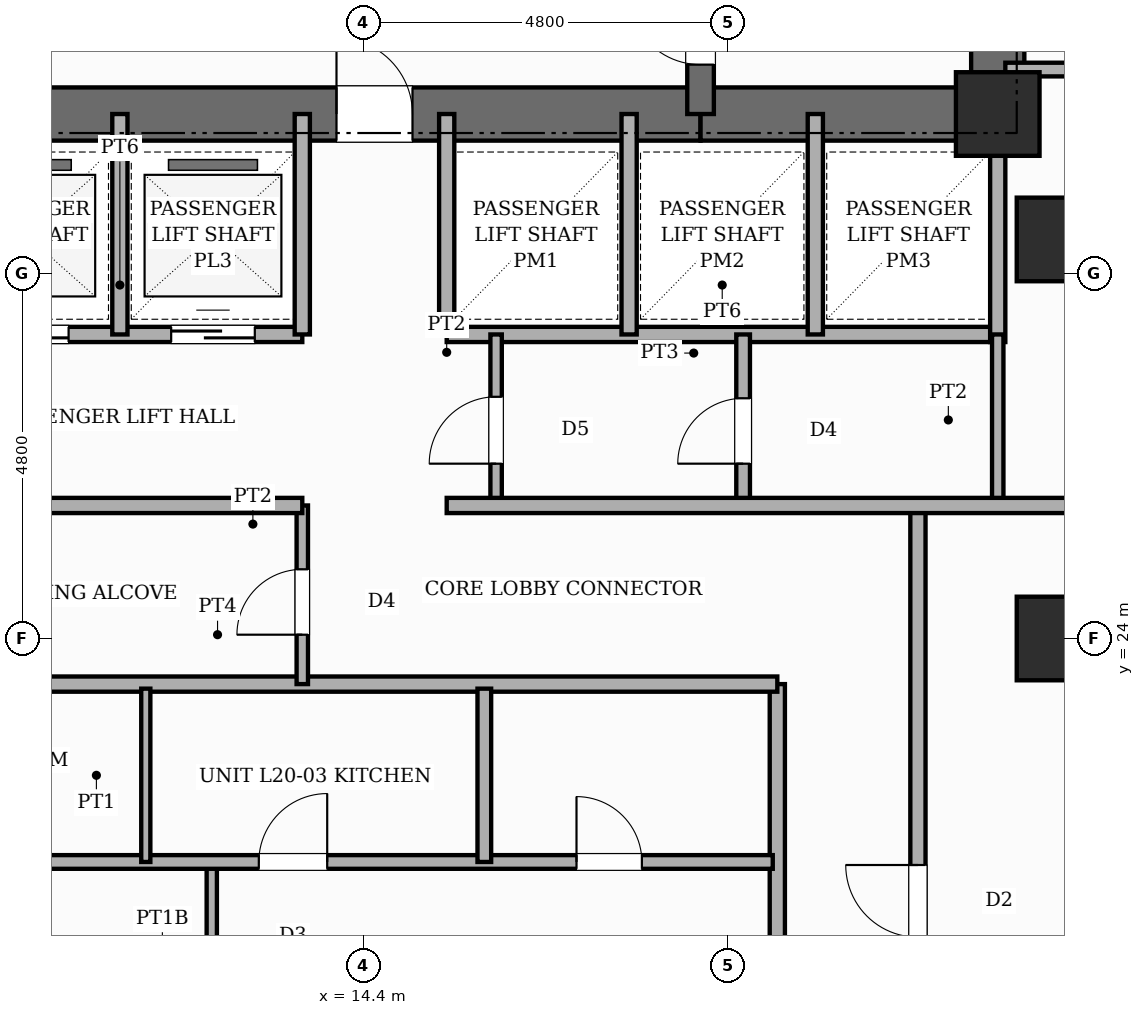
"""IFC4 building model, lengths in metres.
Left out: names, types, materials, properties, quantities, classifications, styles, units other than length and angle.
Written with IfcOpenShell. Run it as: python <this file> out.ifc"""

import sys

from ifc_helpers import new_model, si_unit, direction, frame, frame_2d, origin, origin_2d, place, context, subcontext, project, spatial, rectangle, extrude, element, fill, save


model = new_model("IFC4")
c1 = context("Model", 3, precision=1e-05, world=origin(), true_north=direction((0.0, 1.0)))
c2 = subcontext(c1, "Body", "Model", "MODEL_VIEW")
j1 = project(units=[si_unit("LENGTHUNIT", "METRE"), si_unit("PLANEANGLEUNIT", "RADIAN")], contexts=[c1])
p1 = place(None, origin())
s1 = spatial("IfcSite", under=j1, at=p1, CompositionType="ELEMENT")
p2 = place(p1, origin())
s2 = spatial("IfcBuilding", under=s1, at=p2, CompositionType="ELEMENT")
p3 = place(p2, frame((0.0, 0.0, 79.0)))
s3 = spatial("IfcBuildingStorey", under=s2, at=p3, CompositionType="ELEMENT", Elevation=79.0)
p4 = place(p3, frame((22.75, 30.55, 0.0), z_axis=(0.0, 0.0, 1.0), x_axis=(0.0, 1.0, 0.0)))
e1 = element("IfcWall", 1, at=p4, inside=s3, PredefinedType="SHEAR", context=c2, shape_type="SweptSolid", body=[
    extrude(rectangle(XDim=15.6, YDim=0.7, at=frame_2d((7.8, 0.0))), origin(), (0.0, 0.0, 1.0), 3.6),
])
p5 = place(p4, frame((10.8, 0.0, 0.0)))
e2 = element("IfcOpeningElement", 2, at=p5, cuts=e1, PredefinedType="OPENING", context=c2, shape_type="SweptSolid", body=[
    extrude(rectangle(XDim=1.0, YDim=2.15, at=frame_2d((0.5, 1.075))), frame((0.0, 0.36, 0.0), z_axis=(0.0, -1.0, 0.0), x_axis=(1.0, 0.0, 0.0)), (0.0, 0.0, 1.0), 0.72),
])
p6 = place(p3, frame((9.96, 30.9, 0.0), z_axis=(0.0, 0.0, 1.0), x_axis=(1.0, 0.0, 0.0)))
e3 = element("IfcWall", 3, at=p6, inside=s3, PredefinedType="SHEAR", context=c2, shape_type="SweptSolid", body=[
    extrude(rectangle(XDim=8.88, YDim=0.7, at=frame_2d((4.44, 0.0))), origin(), (0.0, 0.0, 1.0), 3.6),
])
p7 = place(p6, frame((4.09, 0.0, 0.0)))
e4 = element("IfcOpeningElement", 4, at=p7, cuts=e3, PredefinedType="OPENING", context=c2, shape_type="SweptSolid", body=[
    extrude(rectangle(XDim=1.0, YDim=2.15, at=frame_2d((0.5, 1.075))), frame((0.0, 0.36, 0.0), z_axis=(0.0, -1.0, 0.0), x_axis=(1.0, 0.0, 0.0)), (0.0, 0.0, 1.0), 0.72),
])
p8 = place(p3, frame((18.84, 30.9, 0.0), z_axis=(0.0, 0.0, 1.0), x_axis=(1.0, 0.0, 0.0)))
e5 = element("IfcWall", 5, at=p8, inside=s3, PredefinedType="SHEAR", context=c2, shape_type="SweptSolid", body=[
    extrude(rectangle(XDim=3.91, YDim=0.7, at=frame_2d((1.955, 0.0))), origin(), (0.0, 0.0, 1.0), 3.6),
])
p9 = place(p3, frame((18.84, 30.9, 0.0), z_axis=(0.0, 0.0, 1.0), x_axis=(0.0, 1.0, 0.0)))
e6 = element("IfcWall", 6, at=p9, inside=s3, PredefinedType="SHEAR", context=c2, shape_type="SweptSolid", body=[
    extrude(rectangle(XDim=14.9, YDim=0.35, at=frame_2d((7.45, 0.0))), origin(), (0.0, 0.0, 1.0), 3.6),
])
p10 = place(p9, frame((0.65, 0.0, 0.0)))
e7 = element("IfcOpeningElement", 7, at=p10, cuts=e6, PredefinedType="OPENING", context=c2, shape_type="SweptSolid", body=[
    extrude(rectangle(XDim=0.95, YDim=2.1, at=frame_2d((0.475, 1.05))), frame((0.0, 0.185, 0.0), z_axis=(0.0, -1.0, 0.0), x_axis=(1.0, 0.0, 0.0)), (0.0, 0.0, 1.0), 0.37),
])
p11 = place(p9, frame((10.45, 0.0, 0.0)))
e8 = element("IfcOpeningElement", 8, at=p11, cuts=e6, PredefinedType="OPENING", context=c2, shape_type="SweptSolid", body=[
    extrude(rectangle(XDim=1.0, YDim=2.15, at=frame_2d((0.5, 1.075))), frame((0.0, 0.185, 0.0), z_axis=(0.0, -1.0, 0.0), x_axis=(1.0, 0.0, 0.0)), (0.0, 0.0, 1.0), 0.37),
])
for number, where, z_axis, x_axis in (
    (9, (22.75, 30.9, 0.0), (0.0, 0.0, 1.0), (1.0, 0.0, 0.0)),
    (10, (23.55, 24.0, 0.0), (0.0, 0.0, 1.0), (1.0, 0.0, 0.0)),
    (11, (23.55, 29.25, 0.0), (0.0, 0.0, 1.0), (1.0, 0.0, 0.0)),
):
    element("IfcColumn", number, at=place(p3, frame(where, z_axis=z_axis, x_axis=x_axis)), inside=s3, PredefinedType="COLUMN", context=c2, shape_type="SweptSolid", body=[
        extrude(rectangle(XDim=1.1, YDim=1.1, at=origin_2d()), origin(), (0.0, 0.0, 1.0), 3.6),
    ])
p12 = place(p3, frame((6.05, 28.0, 0.0), z_axis=(0.0, 0.0, 1.0), x_axis=(1.0, 0.0, 0.0)))
e12 = element("IfcWall", 12, at=p12, inside=s3, PredefinedType="POLYGONAL", context=c2, shape_type="SweptSolid", body=[
    extrude(rectangle(XDim=7.55, YDim=0.2, at=frame_2d((3.775, 0.0))), origin(), (0.0, 0.0, 1.0), 3.35),
])
p13 = place(p12, frame((0.925, 0.0, 0.0)))
e13 = element("IfcOpeningElement", 13, at=p13, cuts=e12, PredefinedType="OPENING", context=c2, shape_type="SweptSolid", body=[
    extrude(rectangle(XDim=1.1, YDim=2.15, at=frame_2d((0.55, 1.075))), frame((0.0, 0.11, 0.0), z_axis=(0.0, -1.0, 0.0), x_axis=(1.0, 0.0, 0.0)), (0.0, 0.0, 1.0), 0.22),
])
p14 = place(p12, frame((3.375, 0.0, 0.0)))
e14 = element("IfcOpeningElement", 14, at=p14, cuts=e12, PredefinedType="OPENING", context=c2, shape_type="SweptSolid", body=[
    extrude(rectangle(XDim=1.1, YDim=2.15, at=frame_2d((0.55, 1.075))), frame((0.0, 0.11, 0.0), z_axis=(0.0, -1.0, 0.0), x_axis=(1.0, 0.0, 0.0)), (0.0, 0.0, 1.0), 0.22),
])
p15 = place(p12, frame((5.825, 0.0, 0.0)))
e15 = element("IfcOpeningElement", 15, at=p15, cuts=e12, PredefinedType="OPENING", context=c2, shape_type="SweptSolid", body=[
    extrude(rectangle(XDim=1.1, YDim=2.15, at=frame_2d((0.55, 1.075))), frame((0.0, 0.11, 0.0), z_axis=(0.0, -1.0, 0.0), x_axis=(1.0, 0.0, 0.0)), (0.0, 0.0, 1.0), 0.22),
])
p16 = place(p3, frame((15.5, 28.0, 0.0), z_axis=(0.0, 0.0, 1.0), x_axis=(1.0, 0.0, 0.0)))
e16 = element("IfcWall", 16, at=p16, inside=s3, PredefinedType="POLYGONAL", context=c2, shape_type="SweptSolid", body=[
    extrude(rectangle(XDim=7.25, YDim=0.2, at=frame_2d((3.625, 0.0))), origin(), (0.0, 0.0, 1.0), 3.35),
])
p17 = place(p3, frame((22.75, 27.9, 0.0), z_axis=(0.0, 0.0, 1.0), x_axis=(0.0, 1.0, 0.0)))
e17 = element("IfcWall", 17, at=p17, inside=s3, PredefinedType="POLYGONAL", context=c2, shape_type="SweptSolid", body=[
    extrude(rectangle(XDim=3.0, YDim=0.2, at=frame_2d((1.5, 0.0))), origin(), (0.0, 0.0, 1.0), 3.35),
])
for number, where, z_axis, x_axis in (
    (18, (13.6, 28.0, 0.0), (0.0, 0.0, 1.0), (0.0, 1.0, 0.0)),
    (19, (15.5, 28.0, 0.0), (0.0, 0.0, 1.0), (0.0, 1.0, 0.0)),
    (20, (11.2, 28.0, 0.0), (0.0, 0.0, 1.0), (0.0, 1.0, 0.0)),
    (21, (17.9, 28.0, 0.0), (0.0, 0.0, 1.0), (0.0, 1.0, 0.0)),
    (22, (20.35, 28.0, 0.0), (0.0, 0.0, 1.0), (0.0, 1.0, 0.0)),
):
    element("IfcWall", number, at=place(p3, frame(where, z_axis=z_axis, x_axis=x_axis)), inside=s3, PredefinedType="POLYGONAL", context=c2, shape_type="SweptSolid", body=[
        extrude(rectangle(XDim=2.9, YDim=0.2, at=frame_2d((1.45, 0.0))), origin(), (0.0, 0.0, 1.0), 3.35),
    ])
p18 = place(p3, frame((16.15, 25.75, 0.0), z_axis=(0.0, 0.0, 1.0), x_axis=(0.0, 1.0, 0.0)))
e23 = element("IfcWall", 23, at=p18, inside=s3, PredefinedType="PARTITIONING", context=c2, shape_type="SweptSolid", body=[
    extrude(rectangle(XDim=2.25, YDim=0.15, at=frame_2d((1.125, 0.0))), origin(), (0.0, 0.0, 1.0), 3.35),
])
p19 = place(p18, frame((0.55, 0.0, 0.0)))
e24 = element("IfcOpeningElement", 24, at=p19, cuts=e23, PredefinedType="OPENING", context=c2, shape_type="SweptSolid", body=[
    extrude(rectangle(XDim=0.88, YDim=2.1, at=frame_2d((0.44, 1.05))), frame((0.0, 0.085, 0.0), z_axis=(0.0, -1.0, 0.0), x_axis=(1.0, 0.0, 0.0)), (0.0, 0.0, 1.0), 0.17),
])
p20 = place(p3, frame((22.75, 25.75, 0.0), z_axis=(0.0, 0.0, 1.0), x_axis=(0.0, 1.0, 0.0)))
e25 = element("IfcWall", 25, at=p20, inside=s3, PredefinedType="PARTITIONING", context=c2, shape_type="SweptSolid", body=[
    extrude(rectangle(XDim=2.25, YDim=0.15, at=frame_2d((1.125, 0.0))), origin(), (0.0, 0.0, 1.0), 3.35),
])
p21 = place(p3, frame((19.4, 25.75, 0.0), z_axis=(0.0, 0.0, 1.0), x_axis=(0.0, 1.0, 0.0)))
e26 = element("IfcWall", 26, at=p21, inside=s3, PredefinedType="PLUMBINGWALL", context=c2, shape_type="SweptSolid", body=[
    extrude(rectangle(XDim=2.25, YDim=0.18, at=frame_2d((1.125, 0.0))), origin(), (0.0, 0.0, 1.0), 3.35),
])
p22 = place(p21, frame((0.55, 0.0, 0.0)))
e27 = element("IfcOpeningElement", 27, at=p22, cuts=e26, PredefinedType="OPENING", context=c2, shape_type="SweptSolid", body=[
    extrude(rectangle(XDim=0.86, YDim=2.1, at=frame_2d((0.43, 1.05))), frame((0.0, 0.1, 0.0), z_axis=(0.0, -1.0, 0.0), x_axis=(1.0, 0.0, 0.0)), (0.0, 0.0, 1.0), 0.2),
])
p23 = place(p3, frame((19.85, 5.12, 0.0), z_axis=(0.0, 0.0, 1.0), x_axis=(0.0, 1.0, 0.0)))
e28 = element("IfcWall", 28, at=p23, inside=s3, PredefinedType="PARTITIONING", context=c2, shape_type="SweptSolid", body=[
    extrude(rectangle(XDim=18.28, YDim=0.2, at=frame_2d((9.14, 0.0))), origin(), (0.0, 0.0, 1.0), 3.35),
])
p24 = place(p23, frame((1.001, 0.0, 0.0)))
e29 = element("IfcOpeningElement", 29, at=p24, cuts=e28, PredefinedType="OPENING", context=c2, shape_type="SweptSolid", body=[
    extrude(rectangle(XDim=0.98, YDim=2.18, at=frame_2d((0.49, 1.09))), frame((0.0, 0.11, 0.0), z_axis=(0.0, -1.0, 0.0), x_axis=(1.0, 0.0, 0.0)), (0.0, 0.0, 1.0), 0.22),
])
p25 = place(p23, frame((5.88, 0.0, 0.0)))
e30 = element("IfcOpeningElement", 30, at=p25, cuts=e28, PredefinedType="OPENING", context=c2, shape_type="SweptSolid", body=[
    extrude(rectangle(XDim=0.98, YDim=2.18, at=frame_2d((0.49, 1.09))), frame((0.0, 0.11, 0.0), z_axis=(0.0, -1.0, 0.0), x_axis=(1.0, 0.0, 0.0)), (0.0, 0.0, 1.0), 0.22),
])
p26 = place(p23, frame((12.74, 0.0, 0.0)))
e31 = element("IfcOpeningElement", 31, at=p26, cuts=e28, PredefinedType="OPENING", context=c2, shape_type="SweptSolid", body=[
    extrude(rectangle(XDim=0.98, YDim=2.18, at=frame_2d((0.49, 1.09))), frame((0.0, 0.11, 0.0), z_axis=(0.0, -1.0, 0.0), x_axis=(1.0, 0.0, 0.0)), (0.0, 0.0, 1.0), 0.22),
])
p27 = place(p3, frame((21.7, 5.16, 0.0), z_axis=(0.0, 0.0, 1.0), x_axis=(0.0, 1.0, 0.0)))
e32 = element("IfcWall", 32, at=p27, inside=s3, PredefinedType="PARTITIONING", context=c2, shape_type="SweptSolid", body=[
    extrude(rectangle(XDim=20.59, YDim=0.2, at=frame_2d((10.295, 0.0))), origin(), (0.0, 0.0, 1.0), 3.35),
])
p28 = place(p27, frame((5.34, 0.0, 0.0)))
e33 = element("IfcOpeningElement", 33, at=p28, cuts=e32, PredefinedType="OPENING", context=c2, shape_type="SweptSolid", body=[
    extrude(rectangle(XDim=0.95, YDim=2.15, at=frame_2d((0.475, 1.075))), frame((0.0, 0.11, 0.0), z_axis=(0.0, -1.0, 0.0), x_axis=(1.0, 0.0, 0.0)), (0.0, 0.0, 1.0), 0.22),
])
p29 = place(p27, frame((14.91, 0.0, 0.0)))
e34 = element("IfcOpeningElement", 34, at=p29, cuts=e32, PredefinedType="OPENING", context=c2, shape_type="SweptSolid", body=[
    extrude(rectangle(XDim=0.95, YDim=2.15, at=frame_2d((0.475, 1.075))), frame((0.0, 0.11, 0.0), z_axis=(0.0, -1.0, 0.0), x_axis=(1.0, 0.0, 0.0)), (0.0, 0.0, 1.0), 0.22),
])
p30 = place(p3, frame((5.12, 23.4, 0.0), z_axis=(0.0, 0.0, 1.0), x_axis=(1.0, 0.0, 0.0)))
e35 = element("IfcWall", 35, at=p30, inside=s3, PredefinedType="PARTITIONING", context=c2, shape_type="SweptSolid", body=[
    extrude(rectangle(XDim=14.73, YDim=0.2, at=frame_2d((7.365, 0.0))), origin(), (0.0, 0.0, 1.0), 3.35),
])
p31 = place(p3, frame((15.5, 25.75, 0.0), z_axis=(0.0, 0.0, 1.0), x_axis=(1.0, 0.0, 0.0)))
e36 = element("IfcWall", 36, at=p31, inside=s3, PredefinedType="PARTITIONING", context=c2, shape_type="SweptSolid", body=[
    extrude(rectangle(XDim=8.18, YDim=0.2, at=frame_2d((4.09, 0.0))), origin(), (0.0, 0.0, 1.0), 3.35),
])
p32 = place(p3, frame((13.6, 23.4, 0.0), z_axis=(0.0, 0.0, 1.0), x_axis=(0.0, 1.0, 0.0)))
e37 = element("IfcWall", 37, at=p32, inside=s3, PredefinedType="PARTITIONING", context=c2, shape_type="SweptSolid", body=[
    extrude(rectangle(XDim=2.35, YDim=0.15, at=frame_2d((1.175, 0.0))), origin(), (0.0, 0.0, 1.0), 3.35),
])
p33 = place(p32, frame((0.65, 0.0, 0.0)))
e38 = element("IfcOpeningElement", 38, at=p33, cuts=e37, PredefinedType="OPENING", context=c2, shape_type="SweptSolid", body=[
    extrude(rectangle(XDim=0.86, YDim=2.1, at=frame_2d((0.43, 1.05))), frame((0.0, 0.085, 0.0), z_axis=(0.0, -1.0, 0.0), x_axis=(1.0, 0.0, 0.0)), (0.0, 0.0, 1.0), 0.17),
])
p34 = place(p3, frame((5.12, 25.75, 0.0), z_axis=(0.0, 0.0, 1.0), x_axis=(1.0, 0.0, 0.0)))
e39 = element("IfcWall", 39, at=p34, inside=s3, PredefinedType="PARTITIONING", context=c2, shape_type="SweptSolid", body=[
    extrude(rectangle(XDim=8.48, YDim=0.2, at=frame_2d((4.24, 0.0))), origin(), (0.0, 0.0, 1.0), 3.35),
])
p35 = place(p3, frame((12.409, 15.56, 0.0), z_axis=(0.0, 0.0, 1.0), x_axis=(0.0, 1.0, 0.0)))
e40 = element("IfcWall", 40, at=p35, inside=s3, PredefinedType="PARTITIONING", context=c2, shape_type="SweptSolid", body=[
    extrude(rectangle(XDim=5.5, YDim=0.135, at=frame_2d((2.75, 0.0))), origin(), (0.0, 0.0, 1.0), 3.35),
])
p36 = place(p35, frame((2.034, 0.0, 0.0)))
e41 = element("IfcOpeningElement", 41, at=p36, cuts=e40, PredefinedType="OPENING", context=c2, shape_type="SweptSolid", body=[
    extrude(rectangle(XDim=0.9, YDim=2.15, at=frame_2d((0.45, 1.075))), frame((0.0, 0.078, 0.0), z_axis=(0.0, -1.0, 0.0), x_axis=(1.0, 0.0, 0.0)), (0.0, 0.0, 1.0), 0.155),
])
p37 = place(p3, frame((5.12, 21.06, 0.0), z_axis=(0.0, 0.0, 1.0), x_axis=(1.0, 0.0, 0.0)))
e42 = element("IfcWall", 42, at=p37, inside=s3, PredefinedType="PLUMBINGWALL", context=c2, shape_type="SweptSolid", body=[
    extrude(rectangle(XDim=14.67, YDim=0.18, at=frame_2d((7.335, 0.0))), origin(), (0.0, 0.0, 1.0), 3.35),
])
p38 = place(p37, frame((2.284, 0.0, 0.0)))
e43 = element("IfcOpeningElement", 43, at=p38, cuts=e42, PredefinedType="OPENING", context=c2, shape_type="SweptSolid", body=[
    extrude(rectangle(XDim=0.9, YDim=2.15, at=frame_2d((0.45, 1.075))), frame((0.0, 0.1, 0.0), z_axis=(0.0, -1.0, 0.0), x_axis=(1.0, 0.0, 0.0)), (0.0, 0.0, 1.0), 0.2),
])
p39 = place(p37, frame((7.908, 0.0, 0.0)))
e44 = element("IfcOpeningElement", 44, at=p39, cuts=e42, PredefinedType="OPENING", context=c2, shape_type="SweptSolid", body=[
    extrude(rectangle(XDim=0.9, YDim=2.15, at=frame_2d((0.45, 1.075))), frame((0.0, 0.1, 0.0), z_axis=(0.0, -1.0, 0.0), x_axis=(1.0, 0.0, 0.0)), (0.0, 0.0, 1.0), 0.2),
])
p40 = place(p37, frame((12.088, 0.0, 0.0)))
e45 = element("IfcOpeningElement", 45, at=p40, cuts=e42, PredefinedType="OPENING", context=c2, shape_type="SweptSolid", body=[
    extrude(rectangle(XDim=0.86, YDim=2.1, at=frame_2d((0.43, 1.05))), frame((0.0, 0.1, 0.0), z_axis=(0.0, -1.0, 0.0), x_axis=(1.0, 0.0, 0.0)), (0.0, 0.0, 1.0), 0.2),
])
p41 = place(p3, frame((11.541, 21.06, 0.0), z_axis=(0.0, 0.0, 1.0), x_axis=(0.0, 1.0, 0.0)))
e46 = element("IfcWall", 46, at=p41, inside=s3, PredefinedType="PARTITIONING", context=c2, shape_type="SweptSolid", body=[
    extrude(rectangle(XDim=2.28, YDim=0.12, at=frame_2d((1.14, 0.0))), origin(), (0.0, 0.0, 1.0), 3.35),
])
p42 = place(p3, frame((15.995, 21.06, 0.0), z_axis=(0.0, 0.0, 1.0), x_axis=(0.0, 1.0, 0.0)))
e47 = element("IfcWall", 47, at=p42, inside=s3, PredefinedType="PLUMBINGWALL", context=c2, shape_type="SweptSolid", body=[
    extrude(rectangle(XDim=2.28, YDim=0.18, at=frame_2d((1.14, 0.0))), origin(), (0.0, 0.0, 1.0), 3.35),
])
p43 = place(p3, frame((22.85, 31.485, 0.0), z_axis=(0.0, 0.0, 1.0), x_axis=(1.0, 0.0, 0.0)))
e48 = element("IfcWall", 48, at=p43, inside=s3, PredefinedType="PLUMBINGWALL", context=c2, shape_type="SweptSolid", body=[
    extrude(rectangle(XDim=3.9, YDim=0.18, at=frame_2d((1.95, 0.0))), origin(), (0.0, 0.0, 1.0), 3.35),
])
p44 = place(p10, origin())
e49 = element("IfcDoor", 49, at=p44, inside=s3, OperationType="SINGLE_SWING_RIGHT", PredefinedType="DOOR", context=c2, shape_type="SweptSolid", body=[
    extrude(rectangle(XDim=0.95, YDim=2.1, at=frame_2d((0.475, 1.05))), frame((0.0, 0.025, 0.0), z_axis=(0.0, -1.0, 0.0), x_axis=(1.0, 0.0, 0.0)), (0.0, 0.0, 1.0), 0.05),
])
fill(e7, e49)
p45 = place(p7, origin())
e50 = element("IfcDoor", 50, at=p45, inside=s3, OperationType="SINGLE_SWING_LEFT", PredefinedType="DOOR", context=c2, shape_type="SweptSolid", body=[
    extrude(rectangle(XDim=1.0, YDim=2.15, at=frame_2d((0.5, 1.075))), frame((0.0, 0.025, 0.0), z_axis=(0.0, -1.0, 0.0), x_axis=(1.0, 0.0, 0.0)), (0.0, 0.0, 1.0), 0.05),
])
fill(e4, e50)
p46 = place(p14, origin())
e51 = element("IfcDoor", 51, at=p46, inside=s3, OperationType="SLIDING_TO_RIGHT", PredefinedType="DOOR", context=c2, shape_type="SweptSolid", body=[
    extrude(rectangle(XDim=1.1, YDim=2.15, at=frame_2d((0.55, 1.075))), frame((0.0, 0.025, 0.0), z_axis=(0.0, -1.0, 0.0), x_axis=(1.0, 0.0, 0.0)), (0.0, 0.0, 1.0), 0.05),
])
fill(e14, e51)
p47 = place(p15, origin())
e52 = element("IfcDoor", 52, at=p47, inside=s3, OperationType="SLIDING_TO_LEFT", PredefinedType="DOOR", context=c2, shape_type="SweptSolid", body=[
    extrude(rectangle(XDim=1.1, YDim=2.15, at=frame_2d((0.55, 1.075))), frame((0.0, 0.025, 0.0), z_axis=(0.0, -1.0, 0.0), x_axis=(1.0, 0.0, 0.0)), (0.0, 0.0, 1.0), 0.05),
])
fill(e15, e52)
p48 = place(p19, origin())
e53 = element("IfcDoor", 53, at=p48, inside=s3, OperationType="SINGLE_SWING_LEFT", PredefinedType="DOOR", context=c2, shape_type="SweptSolid", body=[
    extrude(rectangle(XDim=0.88, YDim=2.1, at=frame_2d((0.44, 1.05))), frame((0.0, 0.025, 0.0), z_axis=(0.0, -1.0, 0.0), x_axis=(1.0, 0.0, 0.0)), (0.0, 0.0, 1.0), 0.05),
])
fill(e24, e53)
p49 = place(p22, origin())
e54 = element("IfcDoor", 54, at=p49, inside=s3, OperationType="SINGLE_SWING_LEFT", PredefinedType="DOOR", context=c2, shape_type="SweptSolid", body=[
    extrude(rectangle(XDim=0.86, YDim=2.1, at=frame_2d((0.43, 1.05))), frame((0.0, 0.025, 0.0), z_axis=(0.0, -1.0, 0.0), x_axis=(1.0, 0.0, 0.0)), (0.0, 0.0, 1.0), 0.05),
])
fill(e27, e54)
p50 = place(p33, origin())
e55 = element("IfcDoor", 55, at=p50, inside=s3, OperationType="SINGLE_SWING_LEFT", PredefinedType="DOOR", context=c2, shape_type="SweptSolid", body=[
    extrude(rectangle(XDim=0.86, YDim=2.1, at=frame_2d((0.43, 1.05))), frame((0.0, 0.025, 0.0), z_axis=(0.0, -1.0, 0.0), x_axis=(1.0, 0.0, 0.0)), (0.0, 0.0, 1.0), 0.05),
])
fill(e38, e55)
p51 = place(p39, origin())
e56 = element("IfcDoor", 56, at=p51, inside=s3, OperationType="SINGLE_SWING_RIGHT", PredefinedType="DOOR", context=c2, shape_type="SweptSolid", body=[
    extrude(rectangle(XDim=0.9, YDim=2.15, at=frame_2d((0.45, 1.075))), frame((0.0, 0.025, 0.0), z_axis=(0.0, -1.0, 0.0), x_axis=(1.0, 0.0, 0.0)), (0.0, 0.0, 1.0), 0.05),
])
fill(e44, e56)
p52 = place(p40, origin())
e57 = element("IfcDoor", 57, at=p52, inside=s3, OperationType="SINGLE_SWING_LEFT", PredefinedType="DOOR", context=c2, shape_type="SweptSolid", body=[
    extrude(rectangle(XDim=0.86, YDim=2.1, at=frame_2d((0.43, 1.05))), frame((0.0, 0.025, 0.0), z_axis=(0.0, -1.0, 0.0), x_axis=(1.0, 0.0, 0.0)), (0.0, 0.0, 1.0), 0.05),
])
fill(e45, e57)
p53 = place(p29, origin())
e58 = element("IfcDoor", 58, at=p53, inside=s3, OperationType="SINGLE_SWING_RIGHT", PredefinedType="DOOR", context=c2, shape_type="SweptSolid", body=[
    extrude(rectangle(XDim=0.95, YDim=2.15, at=frame_2d((0.475, 1.075))), frame((0.0, 0.025, 0.0), z_axis=(0.0, -1.0, 0.0), x_axis=(1.0, 0.0, 0.0)), (0.0, 0.0, 1.0), 0.05),
])
fill(e34, e58)
save(model, sys.argv[1])
